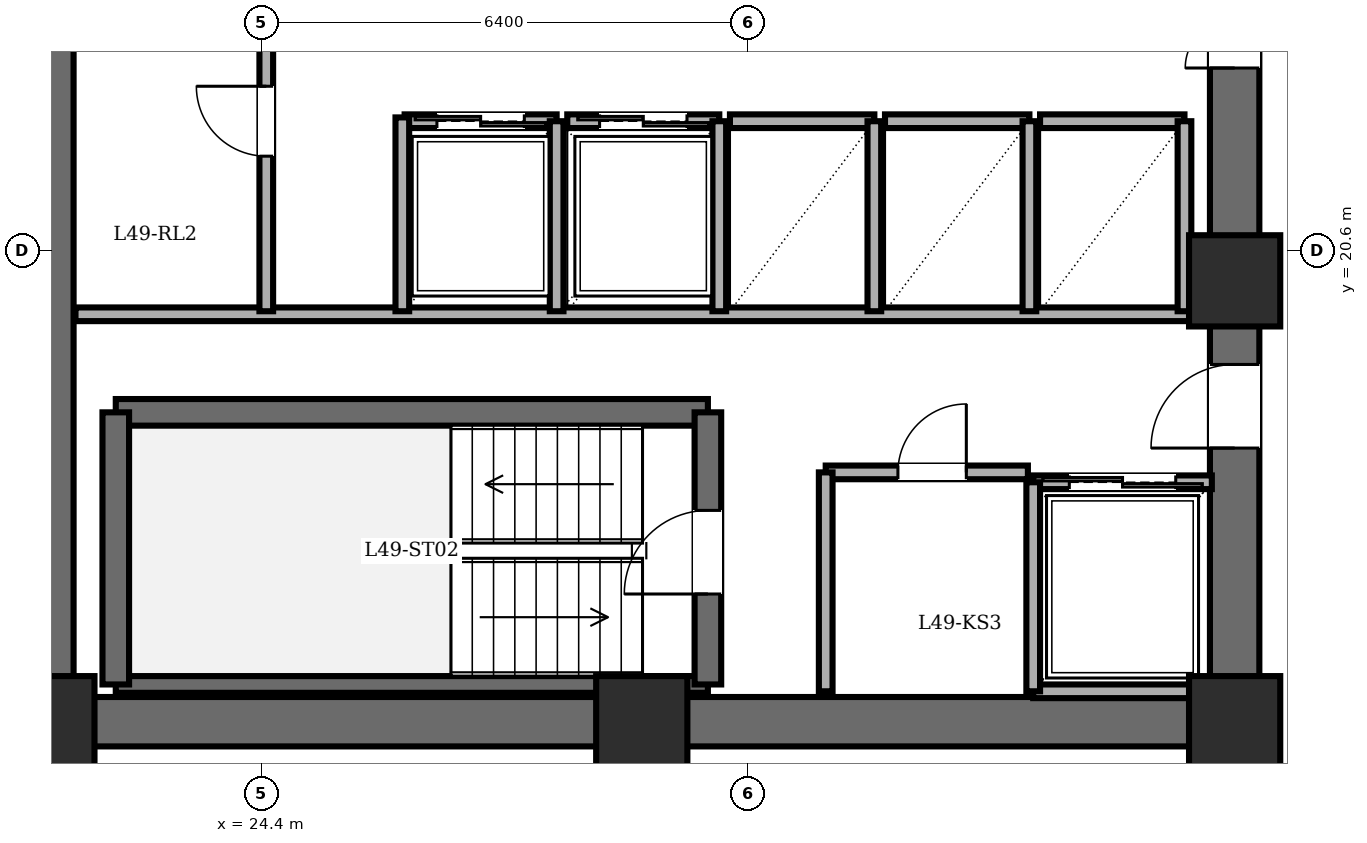
"""IFC4 building model, lengths in metres.
Left out: names, types, materials, properties, quantities, classifications, styles, units other than length and angle.
Written with IfcOpenShell. Run it as: python <this file> out.ifc"""

import sys

from ifc_helpers import new_model, si_unit, direction, frame, frame_2d, origin, origin_2d, place, context, subcontext, project, spatial, rectangle, extrude, element, fill, save


model = new_model("IFC4")
c1 = context("Model", 3, precision=1e-05, world=origin(), true_north=direction((0.0, 1.0)))
c2 = subcontext(c1, "Body", "Model", "MODEL_VIEW")
j1 = project(units=[si_unit("LENGTHUNIT", "METRE"), si_unit("PLANEANGLEUNIT", "RADIAN")], contexts=[c1])
p1 = place(None, origin())
s1 = spatial("IfcSite", under=j1, at=p1, CompositionType="ELEMENT")
p2 = place(p1, origin())
s2 = spatial("IfcBuilding", under=s1, at=p2, CompositionType="ELEMENT")
p3 = place(p2, frame((0.0, 0.0, 187.0)))
s3 = spatial("IfcBuildingStorey", under=s2, at=p3, CompositionType="ELEMENT", Elevation=187.0)
for number, where, z_axis, x_axis in (
    (1, (21.6, 14.4, 0.0), (0.0, 0.0, 1.0), (1.0, 0.0, 0.0)),
    (2, (29.4, 14.4, 0.0), (0.0, 0.0, 1.0), (1.0, 0.0, 0.0)),
    (3, (37.2, 14.4, 0.0), (0.0, 0.0, 1.0), (1.0, 0.0, 0.0)),
    (4, (37.2, 20.2, 0.0), (0.0, 0.0, 1.0), (1.0, 0.0, 0.0)),
):
    element("IfcColumn", number, at=place(p3, frame(where, z_axis=z_axis, x_axis=x_axis)), inside=s3, PredefinedType="COLUMN", context=c2, shape_type="SweptSolid", body=[
        extrude(rectangle(XDim=1.2, YDim=1.2, at=origin_2d()), origin(), (0.0, 0.0, 1.0), 3.6),
    ])
p4 = place(p3, frame((21.6, 14.4, 0.0), z_axis=(0.0, 0.0, 1.0), x_axis=(0.0, 1.0, 0.0)))
e5 = element("IfcWall", 5, at=p4, inside=s3, PredefinedType="SHEAR", context=c2, shape_type="SweptSolid", body=[
    extrude(rectangle(XDim=19.2, YDim=0.65, at=frame_2d((9.6, 0.0))), origin(), (0.0, 0.0, 1.0), 3.36),
])
p5 = place(p3, frame((37.2, 14.4, 0.0), z_axis=(0.0, 0.0, 1.0), x_axis=(-1.0, 0.0, 0.0)))
e6 = element("IfcWall", 6, at=p5, inside=s3, PredefinedType="SHEAR", context=c2, shape_type="SweptSolid", body=[
    extrude(rectangle(XDim=15.6, YDim=0.65, at=frame_2d((7.8, 0.0))), origin(), (0.0, 0.0, 1.0), 3.36),
])
p6 = place(p3, frame((37.2, 14.4, 0.0), z_axis=(0.0, 0.0, 1.0), x_axis=(0.0, 1.0, 0.0)))
e7 = element("IfcWall", 7, at=p6, inside=s3, PredefinedType="SHEAR", context=c2, shape_type="SweptSolid", body=[
    extrude(rectangle(XDim=19.2, YDim=0.65, at=frame_2d((9.6, 0.0))), origin(), (0.0, 0.0, 1.0), 3.36),
])
p7 = place(p6, frame((15.8, 0.0, 0.0)))
e8 = element("IfcOpeningElement", 8, at=p7, cuts=e7, PredefinedType="OPENING", context=c2, shape_type="SweptSolid", body=[
    extrude(rectangle(XDim=1.15, YDim=2.15, at=frame_2d((0.575, 1.075))), frame((0.0, 0.335, 0.0), z_axis=(0.0, -1.0, 0.0), x_axis=(1.0, 0.0, 0.0)), (0.0, 0.0, 1.0), 0.67),
])
p8 = place(p6, frame((3.6, 0.0, 0.0)))
e9 = element("IfcOpeningElement", 9, at=p8, cuts=e7, PredefinedType="OPENING", context=c2, shape_type="SweptSolid", body=[
    extrude(rectangle(XDim=1.1, YDim=2.15, at=frame_2d((0.55, 1.075))), frame((0.0, 0.335, 0.0), z_axis=(0.0, -1.0, 0.0), x_axis=(1.0, 0.0, 0.0)), (0.0, 0.0, 1.0), 0.67),
])
p9 = place(p6, frame((8.6, 0.0, 0.0)))
e10 = element("IfcOpeningElement", 10, at=p9, cuts=e7, PredefinedType="OPENING", context=c2, shape_type="SweptSolid", body=[
    extrude(rectangle(XDim=1.3, YDim=2.2, at=frame_2d((0.65, 1.1))), frame((0.0, 0.335, 0.0), z_axis=(0.0, -1.0, 0.0), x_axis=(1.0, 0.0, 0.0)), (0.0, 0.0, 1.0), 0.67),
])
p10 = place(p3, frame((22.48, 18.47, 0.0), z_axis=(0.0, 0.0, 1.0), x_axis=(1.0, 0.0, 0.0)))
e11 = element("IfcWall", 11, at=p10, inside=s3, PredefinedType="SOLIDWALL", context=c2, shape_type="SweptSolid", body=[
    extrude(rectangle(XDim=7.79, YDim=0.35, at=frame_2d((3.895, 0.0))), origin(), (0.0, 0.0, 1.0), 3.36),
])
p11 = place(p3, frame((22.48, 14.89, 0.0), z_axis=(0.0, 0.0, 1.0), x_axis=(1.0, 0.0, 0.0)))
e12 = element("IfcWall", 12, at=p11, inside=s3, PredefinedType="PARTITIONING", context=c2, shape_type="SweptSolid", body=[
    extrude(rectangle(XDim=7.79, YDim=0.22, at=frame_2d((3.895, 0.0))), origin(), (0.0, 0.0, 1.0), 3.36),
])
p12 = place(p3, frame((22.48, 14.89, 0.0), z_axis=(0.0, 0.0, 1.0), x_axis=(0.0, 1.0, 0.0)))
e13 = element("IfcWall", 13, at=p12, inside=s3, PredefinedType="SOLIDWALL", context=c2, shape_type="SweptSolid", body=[
    extrude(rectangle(XDim=3.58, YDim=0.35, at=frame_2d((1.79, 0.0))), origin(), (0.0, 0.0, 1.0), 3.36),
])
p13 = place(p3, frame((30.27, 14.89, 0.0), z_axis=(0.0, 0.0, 1.0), x_axis=(0.0, 1.0, 0.0)))
e14 = element("IfcWall", 14, at=p13, inside=s3, PredefinedType="SOLIDWALL", context=c2, shape_type="SweptSolid", body=[
    extrude(rectangle(XDim=3.58, YDim=0.35, at=frame_2d((1.79, 0.0))), origin(), (0.0, 0.0, 1.0), 3.36),
])
p14 = place(p13, frame((1.19, 0.0, 0.0)))
e15 = element("IfcOpeningElement", 15, at=p14, cuts=e14, PredefinedType="OPENING", context=c2, shape_type="SweptSolid", body=[
    extrude(rectangle(XDim=1.1, YDim=2.15, at=frame_2d((0.55, 1.075))), frame((0.0, 0.185, 0.0), z_axis=(0.0, -1.0, 0.0), x_axis=(1.0, 0.0, 0.0)), (0.0, 0.0, 1.0), 0.37),
])
p15 = place(p3, frame((21.95, 19.76, 0.0), z_axis=(0.0, 0.0, 1.0), x_axis=(1.0, 0.0, 0.0)))
e16 = element("IfcWall", 16, at=p15, inside=s3, PredefinedType="PARTITIONING", context=c2, shape_type="SweptSolid", body=[
    extrude(rectangle(XDim=14.87, YDim=0.18, at=frame_2d((7.435, 0.0))), origin(), (0.0, 0.0, 1.0), 3.36),
])
p16 = place(p3, frame((31.82, 17.68, 0.0), z_axis=(0.0, 0.0, 1.0), x_axis=(1.0, 0.0, 0.0)))
e17 = element("IfcWall", 17, at=p16, inside=s3, PredefinedType="PARTITIONING", context=c2, shape_type="SweptSolid", body=[
    extrude(rectangle(XDim=2.66, YDim=0.18, at=frame_2d((1.33, 0.0))), origin(), (0.0, 0.0, 1.0), 3.36),
])
p17 = place(p16, frame((0.95, 0.0, 0.0)))
e18 = element("IfcOpeningElement", 18, at=p17, cuts=e17, PredefinedType="OPENING", context=c2, shape_type="SweptSolid", body=[
    extrude(rectangle(XDim=0.9, YDim=2.05, at=frame_2d((0.45, 1.025))), frame((0.0, 0.1, 0.0), z_axis=(0.0, -1.0, 0.0), x_axis=(1.0, 0.0, 0.0)), (0.0, 0.0, 1.0), 0.2),
])
p18 = place(p3, frame((31.82, 14.8, 0.0), z_axis=(0.0, 0.0, 1.0), x_axis=(0.0, 1.0, 0.0)))
e19 = element("IfcWall", 19, at=p18, inside=s3, PredefinedType="PARTITIONING", context=c2, shape_type="SweptSolid", body=[
    extrude(rectangle(XDim=2.88, YDim=0.18, at=frame_2d((1.44, 0.0))), origin(), (0.0, 0.0, 1.0), 3.36),
])
p19 = place(p3, frame((34.55, 17.55, 0.0), z_axis=(0.0, 0.0, 1.0), x_axis=(1.0, 0.0, 0.0)))
e20 = element("IfcWall", 20, at=p19, inside=s3, PredefinedType="PARTITIONING", context=c2, shape_type="SweptSolid", body=[
    extrude(rectangle(XDim=2.35, YDim=0.18, at=frame_2d((1.175, 0.0))), origin(), (0.0, 0.0, 1.0), 3.36),
])
p20 = place(p19, frame((0.475, 0.0, 0.0)))
e21 = element("IfcOpeningElement", 21, at=p20, cuts=e20, PredefinedType="OPENING", context=c2, shape_type="SweptSolid", body=[
    extrude(rectangle(XDim=1.4, YDim=2.3, at=frame_2d((0.7, 1.15))), frame((0.0, 0.1, 0.0), z_axis=(0.0, -1.0, 0.0), x_axis=(1.0, 0.0, 0.0)), (0.0, 0.0, 1.0), 0.2),
])
p21 = place(p3, frame((36.9, 14.8, 0.0), z_axis=(0.0, 0.0, 1.0), x_axis=(-1.0, 0.0, 0.0)))
e22 = element("IfcWall", 22, at=p21, inside=s3, PredefinedType="PARTITIONING", context=c2, shape_type="SweptSolid", body=[
    extrude(rectangle(XDim=2.35, YDim=0.18, at=frame_2d((1.175, 0.0))), origin(), (0.0, 0.0, 1.0), 3.36),
])
p22 = place(p3, frame((34.55, 17.55, 0.0), z_axis=(0.0, 0.0, 1.0), x_axis=(0.0, -1.0, 0.0)))
e23 = element("IfcWall", 23, at=p22, inside=s3, PredefinedType="PARTITIONING", context=c2, shape_type="SweptSolid", body=[
    extrude(rectangle(XDim=2.75, YDim=0.18, at=frame_2d((1.375, 0.0))), origin(), (0.0, 0.0, 1.0), 3.36),
])
p23 = place(p3, frame((26.28, 22.3, 0.0), z_axis=(0.0, 0.0, 1.0), x_axis=(1.0, 0.0, 0.0)))
e24 = element("IfcWall", 24, at=p23, inside=s3, PredefinedType="PARTITIONING", context=c2, shape_type="SweptSolid", body=[
    extrude(rectangle(XDim=2.0, YDim=0.18, at=frame_2d((1.0, 0.0))), origin(), (0.0, 0.0, 1.0), 3.36),
])
p24 = place(p23, frame((0.425, 0.0, 0.0)))
e25 = element("IfcOpeningElement", 25, at=p24, cuts=e24, PredefinedType="OPENING", context=c2, shape_type="SweptSolid", body=[
    extrude(rectangle(XDim=1.15, YDim=2.2, at=frame_2d((0.575, 1.1))), frame((0.0, 0.1, 0.0), z_axis=(0.0, -1.0, 0.0), x_axis=(1.0, 0.0, 0.0)), (0.0, 0.0, 1.0), 0.2),
])
p25 = place(p3, frame((28.28, 19.8, 0.0), z_axis=(0.0, 0.0, 1.0), x_axis=(0.0, 1.0, 0.0)))
e26 = element("IfcWall", 26, at=p25, inside=s3, PredefinedType="PARTITIONING", context=c2, shape_type="SweptSolid", body=[
    extrude(rectangle(XDim=2.5, YDim=0.18, at=frame_2d((1.25, 0.0))), origin(), (0.0, 0.0, 1.0), 3.36),
])
p26 = place(p3, frame((28.42, 22.3, 0.0), z_axis=(0.0, 0.0, 1.0), x_axis=(1.0, 0.0, 0.0)))
e27 = element("IfcWall", 27, at=p26, inside=s3, PredefinedType="PARTITIONING", context=c2, shape_type="SweptSolid", body=[
    extrude(rectangle(XDim=2.0, YDim=0.18, at=frame_2d((1.0, 0.0))), origin(), (0.0, 0.0, 1.0), 3.36),
])
p27 = place(p26, frame((0.425, 0.0, 0.0)))
e28 = element("IfcOpeningElement", 28, at=p27, cuts=e27, PredefinedType="OPENING", context=c2, shape_type="SweptSolid", body=[
    extrude(rectangle(XDim=1.15, YDim=2.2, at=frame_2d((0.575, 1.1))), frame((0.0, 0.1, 0.0), z_axis=(0.0, -1.0, 0.0), x_axis=(1.0, 0.0, 0.0)), (0.0, 0.0, 1.0), 0.2),
])
p28 = place(p3, frame((30.42, 19.8, 0.0), z_axis=(0.0, 0.0, 1.0), x_axis=(0.0, 1.0, 0.0)))
e29 = element("IfcWall", 29, at=p28, inside=s3, PredefinedType="PARTITIONING", context=c2, shape_type="SweptSolid", body=[
    extrude(rectangle(XDim=2.5, YDim=0.18, at=frame_2d((1.25, 0.0))), origin(), (0.0, 0.0, 1.0), 3.36),
])
p29 = place(p3, frame((30.56, 22.3, 0.0), z_axis=(0.0, 0.0, 1.0), x_axis=(1.0, 0.0, 0.0)))
e30 = element("IfcWall", 30, at=p29, inside=s3, PredefinedType="PARTITIONING", context=c2, shape_type="SweptSolid", body=[
    extrude(rectangle(XDim=1.9, YDim=0.18, at=frame_2d((0.95, 0.0))), origin(), (0.0, 0.0, 1.0), 3.36),
])
p30 = place(p3, frame((32.46, 19.8, 0.0), z_axis=(0.0, 0.0, 1.0), x_axis=(0.0, 1.0, 0.0)))
e31 = element("IfcWall", 31, at=p30, inside=s3, PredefinedType="PARTITIONING", context=c2, shape_type="SweptSolid", body=[
    extrude(rectangle(XDim=2.5, YDim=0.18, at=frame_2d((1.25, 0.0))), origin(), (0.0, 0.0, 1.0), 3.36),
])
p31 = place(p3, frame((32.6, 22.3, 0.0), z_axis=(0.0, 0.0, 1.0), x_axis=(1.0, 0.0, 0.0)))
e32 = element("IfcWall", 32, at=p31, inside=s3, PredefinedType="PARTITIONING", context=c2, shape_type="SweptSolid", body=[
    extrude(rectangle(XDim=1.9, YDim=0.18, at=frame_2d((0.95, 0.0))), origin(), (0.0, 0.0, 1.0), 3.36),
])
p32 = place(p3, frame((34.5, 19.8, 0.0), z_axis=(0.0, 0.0, 1.0), x_axis=(0.0, 1.0, 0.0)))
e33 = element("IfcWall", 33, at=p32, inside=s3, PredefinedType="PARTITIONING", context=c2, shape_type="SweptSolid", body=[
    extrude(rectangle(XDim=2.5, YDim=0.18, at=frame_2d((1.25, 0.0))), origin(), (0.0, 0.0, 1.0), 3.36),
])
p33 = place(p3, frame((34.64, 22.3, 0.0), z_axis=(0.0, 0.0, 1.0), x_axis=(1.0, 0.0, 0.0)))
e34 = element("IfcWall", 34, at=p33, inside=s3, PredefinedType="PARTITIONING", context=c2, shape_type="SweptSolid", body=[
    extrude(rectangle(XDim=1.9, YDim=0.18, at=frame_2d((0.95, 0.0))), origin(), (0.0, 0.0, 1.0), 3.36),
])
p34 = place(p3, frame((36.54, 19.8, 0.0), z_axis=(0.0, 0.0, 1.0), x_axis=(0.0, 1.0, 0.0)))
e35 = element("IfcWall", 35, at=p34, inside=s3, PredefinedType="PARTITIONING", context=c2, shape_type="SweptSolid", body=[
    extrude(rectangle(XDim=2.5, YDim=0.18, at=frame_2d((1.25, 0.0))), origin(), (0.0, 0.0, 1.0), 3.36),
])
p35 = place(p3, frame((24.46, 19.8, 0.0), z_axis=(0.0, 0.0, 1.0), x_axis=(0.0, 1.0, 0.0)))
e36 = element("IfcWall", 36, at=p35, inside=s3, PredefinedType="PARTITIONING", context=c2, shape_type="SweptSolid", body=[
    extrude(rectangle(XDim=5.0, YDim=0.18, at=frame_2d((2.5, 0.0))), origin(), (0.0, 0.0, 1.0), 3.36),
])
p36 = place(p35, frame((2.04, 0.0, 0.0)))
e37 = element("IfcOpeningElement", 37, at=p36, cuts=e36, PredefinedType="OPENING", context=c2, shape_type="SweptSolid", body=[
    extrude(rectangle(XDim=0.92, YDim=2.1, at=frame_2d((0.46, 1.05))), frame((0.0, 0.1, 0.0), z_axis=(0.0, -1.0, 0.0), x_axis=(1.0, 0.0, 0.0)), (0.0, 0.0, 1.0), 0.2),
])
p37 = place(p3, frame((26.25, 19.8, 0.0), z_axis=(0.0, 0.0, 1.0), x_axis=(0.0, 1.0, 0.0)))
e38 = element("IfcWall", 38, at=p37, inside=s3, PredefinedType="PARTITIONING", context=c2, shape_type="SweptSolid", body=[
    extrude(rectangle(XDim=2.55, YDim=0.18, at=frame_2d((1.275, 0.0))), origin(), (0.0, 0.0, 1.0), 3.36),
])
p38 = place(p14, origin())
e39 = element("IfcDoor", 39, at=p38, inside=s3, OperationType="SINGLE_SWING_LEFT", PredefinedType="DOOR", context=c2, shape_type="SweptSolid", body=[
    extrude(rectangle(XDim=1.1, YDim=2.15, at=frame_2d((0.55, 1.075))), frame((0.0, 0.025, 0.0), z_axis=(0.0, -1.0, 0.0), x_axis=(1.0, 0.0, 0.0)), (0.0, 0.0, 1.0), 0.05),
])
fill(e15, e39)
p39 = place(p8, origin())
e40 = element("IfcDoor", 40, at=p39, inside=s3, OperationType="SINGLE_SWING_LEFT", PredefinedType="DOOR", context=c2, shape_type="SweptSolid", body=[
    extrude(rectangle(XDim=1.1, YDim=2.15, at=frame_2d((0.55, 1.075))), frame((0.0, 0.025, 0.0), z_axis=(0.0, -1.0, 0.0), x_axis=(1.0, 0.0, 0.0)), (0.0, 0.0, 1.0), 0.05),
])
fill(e9, e40)
p40 = place(p17, origin())
e41 = element("IfcDoor", 41, at=p40, inside=s3, OperationType="SINGLE_SWING_RIGHT", PredefinedType="DOOR", context=c2, shape_type="SweptSolid", body=[
    extrude(rectangle(XDim=0.9, YDim=2.05, at=frame_2d((0.45, 1.025))), frame((0.0, 0.025, 0.0), z_axis=(0.0, -1.0, 0.0), x_axis=(1.0, 0.0, 0.0)), (0.0, 0.0, 1.0), 0.05),
])
fill(e18, e41)
p41 = place(p20, origin())
e42 = element("IfcDoor", 42, at=p41, inside=s3, OperationType="DOUBLE_DOOR_SLIDING", PredefinedType="DOOR", context=c2, shape_type="SweptSolid", body=[
    extrude(rectangle(XDim=1.4, YDim=2.3, at=frame_2d((0.7, 1.15))), frame((0.0, 0.025, 0.0), z_axis=(0.0, -1.0, 0.0), x_axis=(1.0, 0.0, 0.0)), (0.0, 0.0, 1.0), 0.05),
])
fill(e21, e42)
p42 = place(p24, origin())
e43 = element("IfcDoor", 43, at=p42, inside=s3, OperationType="DOUBLE_DOOR_SLIDING", PredefinedType="DOOR", context=c2, shape_type="SweptSolid", body=[
    extrude(rectangle(XDim=1.15, YDim=2.2, at=frame_2d((0.575, 1.1))), frame((0.0, 0.025, 0.0), z_axis=(0.0, -1.0, 0.0), x_axis=(1.0, 0.0, 0.0)), (0.0, 0.0, 1.0), 0.05),
])
fill(e25, e43)
p43 = place(p27, origin())
e44 = element("IfcDoor", 44, at=p43, inside=s3, OperationType="DOUBLE_DOOR_SLIDING", PredefinedType="DOOR", context=c2, shape_type="SweptSolid", body=[
    extrude(rectangle(XDim=1.15, YDim=2.2, at=frame_2d((0.575, 1.1))), frame((0.0, 0.025, 0.0), z_axis=(0.0, -1.0, 0.0), x_axis=(1.0, 0.0, 0.0)), (0.0, 0.0, 1.0), 0.05),
])
fill(e28, e44)
p44 = place(p36, origin())
e45 = element("IfcDoor", 45, at=p44, inside=s3, OperationType="SINGLE_SWING_RIGHT", PredefinedType="DOOR", context=c2, shape_type="SweptSolid", body=[
    extrude(rectangle(XDim=0.92, YDim=2.1, at=frame_2d((0.46, 1.05))), frame((0.0, 0.025, 0.0), z_axis=(0.0, -1.0, 0.0), x_axis=(1.0, 0.0, 0.0)), (0.0, 0.0, 1.0), 0.05),
])
fill(e37, e45)
p45 = place(p9, origin())
e46 = element("IfcDoor", 46, at=p45, inside=s3, OperationType="DOUBLE_DOOR_SINGLE_SWING", PredefinedType="DOOR", context=c2, shape_type="SweptSolid", body=[
    extrude(rectangle(XDim=1.3, YDim=2.2, at=frame_2d((0.65, 1.1))), frame((0.0, 0.025, 0.0), z_axis=(0.0, -1.0, 0.0), x_axis=(1.0, 0.0, 0.0)), (0.0, 0.0, 1.0), 0.05),
])
fill(e10, e46)
save(model, sys.argv[1])
